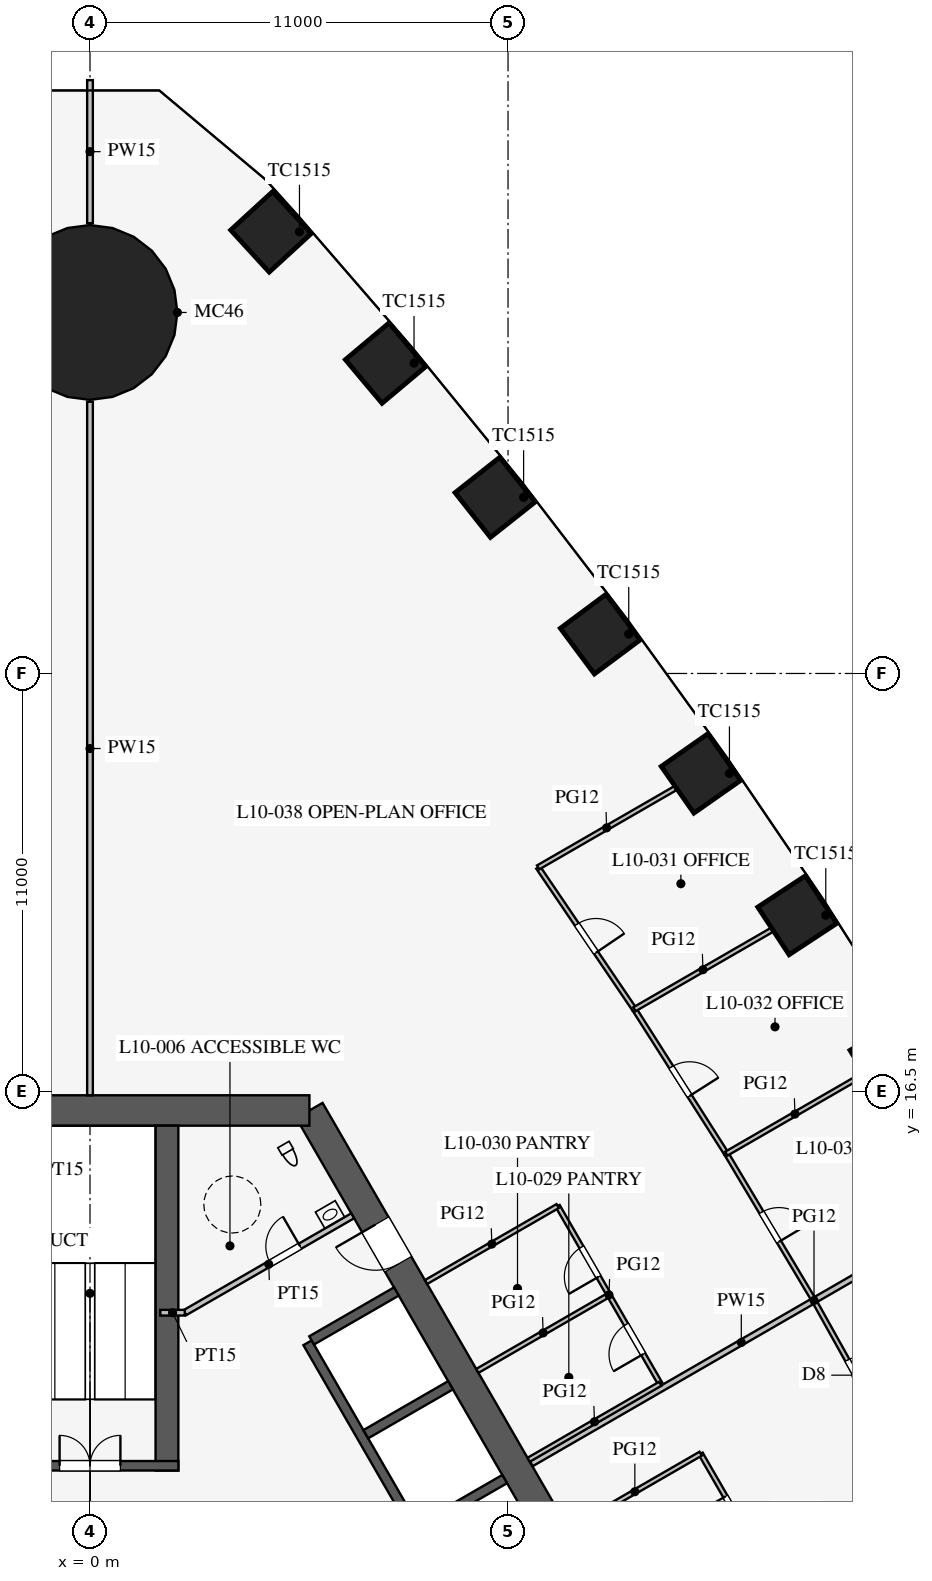
"""IFC4 building model, lengths in metres.
Left out: names, types, materials, properties, quantities, classifications, styles, units other than length and angle.
Written with IfcOpenShell. Run it as: python <this file> out.ifc"""

import sys

from ifc_helpers import new_model, si_unit, direction, frame, frame_2d, origin, origin_2d, place, context, subcontext, project, spatial, rectangle, circle, extrude, element, fill, save


model = new_model("IFC4")
c1 = context("Model", 3, precision=1e-05, world=origin(), true_north=direction((0.0, 1.0)))
c2 = subcontext(c1, "Body", "Model", "MODEL_VIEW")
j1 = project(units=[si_unit("LENGTHUNIT", "METRE"), si_unit("PLANEANGLEUNIT", "RADIAN")], contexts=[c1])
p1 = place(None, origin())
s1 = spatial("IfcSite", under=j1, at=p1, CompositionType="ELEMENT")
p2 = place(p1, origin())
s2 = spatial("IfcBuilding", under=s1, at=p2, CompositionType="ELEMENT")
p3 = place(p2, frame((0.0, 0.0, 45.9)))
s3 = spatial("IfcBuildingStorey", under=s2, at=p3, CompositionType="ELEMENT", Elevation=45.9)
for number, where, z_axis, x_axis in (
    (1, (21.031, 17.339, 0.0), (0.0, 0.0, 1.0), (-0.525, 0.851, 0.0)),
    (2, (18.611, 21.137, 0.0), (0.0, 0.0, 1.0), (-0.549, 0.836, 0.0)),
    (3, (16.076, 24.87, 0.0), (0.0, 0.0, 1.0), (-0.574, 0.819, 0.0)),
    (4, (13.426, 28.536, 0.0), (0.0, 0.0, 1.0), (-0.597, 0.802, 0.0)),
    (5, (10.66, 32.135, 0.0), (0.0, 0.0, 1.0), (-0.62, 0.784, 0.0)),
    (6, (7.776, 35.667, 0.0), (0.0, 0.0, 1.0), (-0.643, 0.766, 0.0)),
    (7, (4.762, 39.122, 0.0), (0.0, 0.0, 1.0), (-0.676, 0.737, 0.0)),
):
    element("IfcColumn", number, at=place(p3, frame(where, z_axis=z_axis, x_axis=x_axis)), inside=s3, PredefinedType="COLUMN", context=c2, shape_type="SweptSolid", body=[
        extrude(rectangle(XDim=1.5, YDim=1.5, at=origin_2d()), origin(), (0.0, 0.0, 1.0), 4.2),
    ])
p4 = place(p3, frame((0.0, 37.0, 0.0), z_axis=(0.0, 0.0, 1.0), x_axis=(1.0, 0.0, 0.0)))
e8 = element("IfcColumn", 8, at=p4, inside=s3, PredefinedType="COLUMN", context=c2, shape_type="SweptSolid", body=[
    extrude(circle(Radius=2.3, at=origin_2d()), origin(), (0.0, 0.0, 1.0), 4.2),
])
p5 = place(p3, frame((16.743, -3.0, 0.0), z_axis=(0.0, 0.0, 1.0), x_axis=(-0.500002442456, 0.866023993627, 0.0)))
e9 = element("IfcWall", 9, at=p5, inside=s3, PredefinedType="SHEAR", context=c2, shape_type="SweptSolid", body=[
    extrude(rectangle(XDim=21.939, YDim=0.8, at=frame_2d((10.97, 0.0))), origin(), (0.0, 0.0, 1.0), 4.2),
])
p6 = place(p5, frame((17.27, 0.0, 0.0)))
e10 = element("IfcOpeningElement", 10, at=p6, cuts=e9, PredefinedType="OPENING", context=c2, shape_type="SweptSolid", body=[
    extrude(rectangle(XDim=1.2, YDim=2.1, at=frame_2d((0.6, 1.05))), frame((0.0, 0.41, 0.0), z_axis=(0.0, -1.0, 0.0), x_axis=(1.0, 0.0, 0.0)), (0.0, 0.0, 1.0), 0.82),
])
p7 = place(p5, frame((3.47, 0.0, 0.0)))
e11 = element("IfcOpeningElement", 11, at=p7, cuts=e9, PredefinedType="OPENING", context=c2, shape_type="SweptSolid", body=[
    extrude(rectangle(XDim=1.2, YDim=2.1, at=frame_2d((0.6, 1.05))), frame((0.0, 0.41, 0.0), z_axis=(0.0, -1.0, 0.0), x_axis=(1.0, 0.0, 0.0)), (0.0, 0.0, 1.0), 0.82),
])
p8 = place(p3, frame((5.773, 16.0, 0.0), z_axis=(0.0, 0.0, 1.0), x_axis=(-1.0, 0.0, 0.0)))
e12 = element("IfcWall", 12, at=p8, inside=s3, PredefinedType="SHEAR", context=c2, shape_type="SweptSolid", body=[
    extrude(rectangle(XDim=11.547, YDim=0.8, at=frame_2d((5.773, 0.0))), origin(), (0.0, 0.0, 1.0), 4.2),
])
p9 = place(p3, frame((11.424, 0.014, 0.0), z_axis=(0.0, 0.0, 1.0), x_axis=(-0.500001763848, 0.866024385424, 0.0)))
e13 = element("IfcWall", 13, at=p9, inside=s3, PredefinedType="SHEAR", context=c2, shape_type="SweptSolid", body=[
    extrude(rectangle(XDim=11.4, YDim=0.25, at=frame_2d((5.7, 0.0))), origin(), (0.0, 0.0, 1.0), 4.2),
])
for number, where, z_axis, x_axis in (
    (14, (8.682, 5.012, 0.0), (0.0, 0.0, 1.0), (0.866, 0.5, 0.0)),
    (15, (7.257, 7.481, 0.0), (0.0, 0.0, 1.0), (0.866, 0.5, 0.0)),
):
    element("IfcWall", number, at=place(p3, frame(where, z_axis=z_axis, x_axis=x_axis)), inside=s3, PredefinedType="SHEAR", context=c2, shape_type="SweptSolid", body=[
        extrude(rectangle(XDim=2.575, YDim=0.25, at=frame_2d((1.288, 0.0))), origin(), (0.0, 0.0, 1.0), 4.2),
    ])
p10 = place(p3, frame((5.832, 9.949, 0.0), z_axis=(0.0, 0.0, 1.0), x_axis=(0.866029291668, 0.499993265928, 0.0)))
e16 = element("IfcWall", 16, at=p10, inside=s3, PredefinedType="SHEAR", context=c2, shape_type="SweptSolid", body=[
    extrude(rectangle(XDim=2.575, YDim=0.25, at=frame_2d((1.288, 0.0))), origin(), (0.0, 0.0, 1.0), 4.2),
])
p11 = place(p3, frame((2.025, 6.525, 0.0), z_axis=(0.0, 0.0, 1.0), x_axis=(0.0, 1.0, 0.0)))
e17 = element("IfcWall", 17, at=p11, inside=s3, PredefinedType="SHEAR", context=c2, shape_type="SweptSolid", body=[
    extrude(rectangle(XDim=9.075, YDim=0.6, at=frame_2d((4.538, 0.0))), origin(), (0.0, 0.0, 1.0), 4.2),
])
p12 = place(p3, frame((2.325, 6.65, 0.0), z_axis=(0.0, 0.0, 1.0), x_axis=(-1.0, 0.0, 0.0)))
e18 = element("IfcWall", 18, at=p12, inside=s3, PredefinedType="SHEAR", context=c2, shape_type="SweptSolid", body=[
    extrude(rectangle(XDim=4.65, YDim=0.25, at=frame_2d((2.325, 0.0))), origin(), (0.0, 0.0, 1.0), 4.2),
])
p13 = place(p12, frame((1.525, 0.0, 0.0)))
e19 = element("IfcOpeningElement", 19, at=p13, cuts=e18, PredefinedType="OPENING", context=c2, shape_type="SweptSolid", body=[
    extrude(rectangle(XDim=1.6, YDim=2.1, at=frame_2d((0.8, 1.05))), frame((0.0, 0.135, 0.0), z_axis=(0.0, -1.0, 0.0), x_axis=(1.0, 0.0, 0.0)), (0.0, 0.0, 1.0), 0.27),
])
p14 = place(p3, frame((2.495, 10.678, 0.0), z_axis=(0.0, 0.0, 1.0), x_axis=(0.86602216432, 0.500005610874, 0.0)))
e20 = element("IfcWall", 20, at=p14, inside=s3, PredefinedType="PARTITIONING", context=c2, shape_type="SweptSolid", body=[
    extrude(rectangle(XDim=5.1, YDim=0.15, at=frame_2d((2.55, 0.0))), origin(), (0.0, 0.0, 1.0), 4.0),
])
p15 = place(p14, frame((2.6, 0.0, 0.0)))
e21 = element("IfcOpeningElement", 21, at=p15, cuts=e20, PredefinedType="OPENING", context=c2, shape_type="SweptSolid", body=[
    extrude(rectangle(XDim=0.9, YDim=2.1, at=frame_2d((0.45, 1.05))), frame((0.0, 0.085, 0.0), z_axis=(0.0, -1.0, 0.0), x_axis=(1.0, 0.0, 0.0)), (0.0, 0.0, 1.0), 0.17),
])
p16 = place(p3, frame((2.495, 10.678, 0.0), z_axis=(0.0, 0.0, 1.0), x_axis=(-1.0, 0.0, 0.0)))
e22 = element("IfcWall", 22, at=p16, inside=s3, PredefinedType="PARTITIONING", context=c2, shape_type="SweptSolid", body=[
    extrude(rectangle(XDim=0.645, YDim=0.15, at=frame_2d((0.323, 0.0))), origin(), (0.0, 0.0, 1.0), 4.0),
])
p17 = place(p3, frame((0.0, 16.4, 0.0), z_axis=(0.0, 0.0, 1.0), x_axis=(0.0, 1.0, 0.0)))
e23 = element("IfcWall", 23, at=p17, inside=s3, PredefinedType="PARTITIONING", context=c2, shape_type="SweptSolid", body=[
    extrude(rectangle(XDim=18.25, YDim=0.15, at=frame_2d((9.125, 0.0))), origin(), (0.0, 0.0, 1.0), 2.3),
])
p18 = place(p3, frame((0.0, 39.35, 0.0), z_axis=(0.0, 0.0, 1.0), x_axis=(0.0, 1.0, 0.0)))
e24 = element("IfcWall", 24, at=p18, inside=s3, PredefinedType="PARTITIONING", context=c2, shape_type="SweptSolid", body=[
    extrude(rectangle(XDim=3.764, YDim=0.15, at=frame_2d((1.882, 0.0))), origin(), (0.0, 0.0, 1.0), 2.3),
])
p19 = place(p3, frame((11.613, 6.705, 0.0), z_axis=(0.0, 0.0, 1.0), x_axis=(0.86602785495, 0.499995754432, 0.0)))
e25 = element("IfcWall", 25, at=p19, inside=s3, PredefinedType="PARTITIONING", context=c2, shape_type="SweptSolid", body=[
    extrude(rectangle(XDim=12.759, YDim=0.15, at=frame_2d((6.379, 0.0))), origin(), (0.0, 0.0, 1.0), 3.2),
])
p20 = place(p3, frame((15.006, 8.808, 0.0), z_axis=(0.0, 0.0, 1.0), x_axis=(-0.500048589285, 0.86599734893, 0.0)))
e26 = element("IfcWall", 26, at=p20, inside=s3, PredefinedType="PARTITIONING", context=c2, shape_type="SweptSolid", body=[
    extrude(rectangle(XDim=2.7, YDim=0.12, at=frame_2d((1.35, 0.0))), origin(), (0.0, 0.0, 1.0), 2.9),
])
p21 = place(p20, frame((0.9, 0.0, 0.15)))
e27 = element("IfcOpeningElement", 27, at=p21, cuts=e26, PredefinedType="OPENING", context=c2, shape_type="SweptSolid", body=[
    extrude(rectangle(XDim=0.9, YDim=2.1, at=frame_2d((0.45, 1.05))), frame((0.0, 0.07, 0.0), z_axis=(0.0, -1.0, 0.0), x_axis=(1.0, 0.0, 0.0)), (0.0, 0.0, 1.0), 0.14),
])
p22 = place(p3, frame((13.656, 11.146, 0.0), z_axis=(0.0, 0.0, 1.0), x_axis=(-0.4999416173, 0.866059108428, 0.0)))
e28 = element("IfcWall", 28, at=p22, inside=s3, PredefinedType="PARTITIONING", context=c2, shape_type="SweptSolid", body=[
    extrude(rectangle(XDim=2.7, YDim=0.12, at=frame_2d((1.35, 0.0))), origin(), (0.0, 0.0, 1.0), 2.9),
])
p23 = place(p22, frame((0.55, 0.0, 0.15)))
e29 = element("IfcOpeningElement", 29, at=p23, cuts=e28, PredefinedType="OPENING", context=c2, shape_type="SweptSolid", body=[
    extrude(rectangle(XDim=0.9, YDim=2.1, at=frame_2d((0.45, 1.05))), frame((0.0, 0.07, 0.0), z_axis=(0.0, -1.0, 0.0), x_axis=(1.0, 0.0, 0.0)), (0.0, 0.0, 1.0), 0.14),
])
p24 = place(p3, frame((17.869, 3.85, 0.0), z_axis=(0.0, 0.0, 1.0), x_axis=(-0.500012057535, 0.866018442252, 0.0)))
e30 = element("IfcWall", 30, at=p24, inside=s3, PredefinedType="PARTITIONING", context=c2, shape_type="SweptSolid", body=[
    extrude(rectangle(XDim=3.6, YDim=0.12, at=frame_2d((1.8, 0.0))), origin(), (0.0, 0.0, 1.0), 2.9),
])
p25 = place(p24, frame((1.3, 0.0, 0.15)))
e31 = element("IfcOpeningElement", 31, at=p25, cuts=e30, PredefinedType="OPENING", context=c2, shape_type="SweptSolid", body=[
    extrude(rectangle(XDim=1.0, YDim=2.1, at=frame_2d((0.5, 1.05))), frame((0.0, 0.07, 0.0), z_axis=(0.0, -1.0, 0.0), x_axis=(1.0, 0.0, 0.0)), (0.0, 0.0, 1.0), 0.14),
])
for number, where, z_axis, x_axis in (
    (32, (11.542, 6.808, 0.0), (0.0, 0.0, 1.0), (0.866, 0.5, 0.0)),
    (33, (10.192, 9.146, 0.0), (0.0, 0.0, 1.0), (0.866, 0.5, 0.0)),
    (34, (8.842, 11.485, 0.0), (0.0, 0.0, 1.0), (0.866, 0.5, 0.0)),
    (35, (12.605, 4.968, 0.0), (0.0, 0.0, 1.0), (0.866, 0.5, 0.0)),
):
    element("IfcWall", number, at=place(p3, frame(where, z_axis=z_axis, x_axis=x_axis)), inside=s3, PredefinedType="PARTITIONING", context=c2, shape_type="SweptSolid", body=[
        extrude(rectangle(XDim=4.0, YDim=0.12, at=frame_2d((2.0, 0.0))), origin(), (0.0, 0.0, 1.0), 2.9),
    ])
p26 = place(p3, frame((19.052, 10.999, 0.0), z_axis=(0.0, 0.0, 1.0), x_axis=(-0.51252396108, 0.858672923364, 0.0)))
e36 = element("IfcWall", 36, at=p26, inside=s3, PredefinedType="PARTITIONING", context=c2, shape_type="SweptSolid", body=[
    extrude(rectangle(XDim=4.5, YDim=0.12, at=frame_2d((2.25, 0.0))), origin(), (0.0, 0.0, 1.0), 2.9),
])
p27 = place(p26, frame((1.8, 0.0, 0.15)))
e37 = element("IfcOpeningElement", 37, at=p27, cuts=e36, PredefinedType="OPENING", context=c2, shape_type="SweptSolid", body=[
    extrude(rectangle(XDim=0.9, YDim=2.1, at=frame_2d((0.45, 1.05))), frame((0.0, 0.07, 0.0), z_axis=(0.0, -1.0, 0.0), x_axis=(1.0, 0.0, 0.0)), (0.0, 0.0, 1.0), 0.14),
])
p28 = place(p3, frame((16.745, 14.864, 0.0), z_axis=(0.0, 0.0, 1.0), x_axis=(-0.537205132487, 0.843451626135, 0.0)))
e38 = element("IfcWall", 38, at=p28, inside=s3, PredefinedType="PARTITIONING", context=c2, shape_type="SweptSolid", body=[
    extrude(rectangle(XDim=4.504, YDim=0.12, at=frame_2d((2.252, 0.0))), origin(), (0.0, 0.0, 1.0), 2.9),
])
p29 = place(p28, frame((1.8, 0.0, 0.15)))
e39 = element("IfcOpeningElement", 39, at=p29, cuts=e38, PredefinedType="OPENING", context=c2, shape_type="SweptSolid", body=[
    extrude(rectangle(XDim=0.9, YDim=2.1, at=frame_2d((0.45, 1.05))), frame((0.0, 0.07, 0.0), z_axis=(0.0, -1.0, 0.0), x_axis=(1.0, 0.0, 0.0)), (0.0, 0.0, 1.0), 0.14),
])
p30 = place(p3, frame((14.325, 18.663, 0.0), z_axis=(0.0, 0.0, 1.0), x_axis=(-0.561512004239, 0.827468591002, 0.0)))
e40 = element("IfcWall", 40, at=p30, inside=s3, PredefinedType="PARTITIONING", context=c2, shape_type="SweptSolid", body=[
    extrude(rectangle(XDim=4.512, YDim=0.12, at=frame_2d((2.256, 0.0))), origin(), (0.0, 0.0, 1.0), 2.9),
])
p31 = place(p30, frame((1.8, 0.0, 0.15)))
e41 = element("IfcOpeningElement", 41, at=p31, cuts=e40, PredefinedType="OPENING", context=c2, shape_type="SweptSolid", body=[
    extrude(rectangle(XDim=0.9, YDim=2.1, at=frame_2d((0.45, 1.05))), frame((0.0, 0.07, 0.0), z_axis=(0.0, -1.0, 0.0), x_axis=(1.0, 0.0, 0.0)), (0.0, 0.0, 1.0), 0.14),
])
p32 = place(p3, frame((21.245, 7.07, 0.0), z_axis=(0.0, 0.0, 1.0), x_axis=(-0.487373854787, 0.873193406795, 0.0)))
e42 = element("IfcWall", 42, at=p32, inside=s3, PredefinedType="PARTITIONING", context=c2, shape_type="SweptSolid", body=[
    extrude(rectangle(XDim=4.5, YDim=0.12, at=frame_2d((2.25, 0.0))), origin(), (0.0, 0.0, 1.0), 2.9),
])
p33 = place(p32, frame((1.8, 0.0, 0.15)))
e43 = element("IfcOpeningElement", 43, at=p33, cuts=e42, PredefinedType="OPENING", context=c2, shape_type="SweptSolid", body=[
    extrude(rectangle(XDim=0.9, YDim=2.1, at=frame_2d((0.45, 1.05))), frame((0.0, 0.07, 0.0), z_axis=(0.0, -1.0, 0.0), x_axis=(1.0, 0.0, 0.0)), (0.0, 0.0, 1.0), 0.14),
])
p34 = place(p3, frame((11.792, 22.396, 0.0), z_axis=(0.0, 0.0, 1.0), x_axis=(0.866011781705, 0.500023593391, 0.0)))
e44 = element("IfcWall", 44, at=p34, inside=s3, PredefinedType="PARTITIONING", context=c2, shape_type="SweptSolid", body=[
    extrude(rectangle(XDim=4.164, YDim=0.12, at=frame_2d((2.082, 0.0))), origin(), (0.0, 0.0, 1.0), 2.9),
])
p35 = place(p3, frame((16.745, 14.864, 0.0), z_axis=(0.0, 0.0, 1.0), x_axis=(0.866025669538, 0.499999539701, 0.0)))
e45 = element("IfcWall", 45, at=p35, inside=s3, PredefinedType="PARTITIONING", context=c2, shape_type="SweptSolid", body=[
    extrude(rectangle(XDim=4.169, YDim=0.12, at=frame_2d((2.085, 0.0))), origin(), (0.0, 0.0, 1.0), 2.9),
])
p36 = place(p3, frame((14.325, 18.663, 0.0), z_axis=(0.0, 0.0, 1.0), x_axis=(0.866009971343, 0.50002672882, 0.0)))
e46 = element("IfcWall", 46, at=p36, inside=s3, PredefinedType="PARTITIONING", context=c2, shape_type="SweptSolid", body=[
    extrude(rectangle(XDim=4.167, YDim=0.12, at=frame_2d((2.083, 0.0))), origin(), (0.0, 0.0, 1.0), 2.9),
])
p37 = place(p15, origin())
e47 = element("IfcDoor", 47, at=p37, inside=s3, OperationType="SINGLE_SWING_RIGHT", PredefinedType="DOOR", context=c2, shape_type="SweptSolid", body=[
    extrude(rectangle(XDim=0.9, YDim=2.1, at=frame_2d((0.45, 1.05))), frame((0.0, 0.025, 0.0), z_axis=(0.0, -1.0, 0.0), x_axis=(1.0, 0.0, 0.0)), (0.0, 0.0, 1.0), 0.05),
])
fill(e21, e47)
p38 = place(p13, frame((1.6, 0.0, 0.0), z_axis=(0.0, 0.0, 1.0), x_axis=(-1.0, 0.0, 0.0)))
e48 = element("IfcDoor", 48, at=p38, inside=s3, OperationType="DOUBLE_DOOR_SINGLE_SWING", PredefinedType="DOOR", context=c2, shape_type="SweptSolid", body=[
    extrude(rectangle(XDim=1.6, YDim=2.1, at=frame_2d((0.8, 1.05))), frame((0.0, 0.025, 0.0), z_axis=(0.0, -1.0, 0.0), x_axis=(1.0, 0.0, 0.0)), (0.0, 0.0, 1.0), 0.05),
])
fill(e19, e48)
p39 = place(p6, origin())
e49 = element("IfcDoor", 49, at=p39, inside=s3, OperationType="SINGLE_SWING_RIGHT", PredefinedType="DOOR", context=c2, shape_type="SweptSolid", body=[
    extrude(rectangle(XDim=1.2, YDim=2.1, at=frame_2d((0.6, 1.05))), frame((0.0, 0.025, 0.0), z_axis=(0.0, -1.0, 0.0), x_axis=(1.0, 0.0, 0.0)), (0.0, 0.0, 1.0), 0.05),
])
fill(e10, e49)
p40 = place(p25, origin())
e50 = element("IfcDoor", 50, at=p40, inside=s3, OperationType="SINGLE_SWING_RIGHT", PredefinedType="DOOR", context=c2, shape_type="SweptSolid", body=[
    extrude(rectangle(XDim=1.0, YDim=2.1, at=frame_2d((0.5, 1.05))), frame((0.0, 0.025, 0.0), z_axis=(0.0, -1.0, 0.0), x_axis=(1.0, 0.0, 0.0)), (0.0, 0.0, 1.0), 0.05),
])
fill(e31, e50)
p41 = place(p21, origin())
e51 = element("IfcDoor", 51, at=p41, inside=s3, OperationType="SINGLE_SWING_LEFT", PredefinedType="DOOR", context=c2, shape_type="SweptSolid", body=[
    extrude(rectangle(XDim=0.9, YDim=2.1, at=frame_2d((0.45, 1.05))), frame((0.0, 0.025, 0.0), z_axis=(0.0, -1.0, 0.0), x_axis=(1.0, 0.0, 0.0)), (0.0, 0.0, 1.0), 0.05),
])
fill(e27, e51)
p42 = place(p23, origin())
e52 = element("IfcDoor", 52, at=p42, inside=s3, OperationType="SINGLE_SWING_LEFT", PredefinedType="DOOR", context=c2, shape_type="SweptSolid", body=[
    extrude(rectangle(XDim=0.9, YDim=2.1, at=frame_2d((0.45, 1.05))), frame((0.0, 0.025, 0.0), z_axis=(0.0, -1.0, 0.0), x_axis=(1.0, 0.0, 0.0)), (0.0, 0.0, 1.0), 0.05),
])
fill(e29, e52)
p43 = place(p31, frame((0.9, 0.0, 0.0), z_axis=(0.0, 0.0, 1.0), x_axis=(-1.0, 0.0, 0.0)))
e53 = element("IfcDoor", 53, at=p43, inside=s3, OperationType="SINGLE_SWING_RIGHT", PredefinedType="DOOR", context=c2, shape_type="SweptSolid", body=[
    extrude(rectangle(XDim=0.9, YDim=2.1, at=frame_2d((0.45, 1.05))), frame((0.0, 0.025, 0.0), z_axis=(0.0, -1.0, 0.0), x_axis=(1.0, 0.0, 0.0)), (0.0, 0.0, 1.0), 0.05),
])
fill(e41, e53)
p44 = place(p29, frame((0.9, 0.0, 0.0), z_axis=(0.0, 0.0, 1.0), x_axis=(-1.0, 0.0, 0.0)))
e54 = element("IfcDoor", 54, at=p44, inside=s3, OperationType="SINGLE_SWING_RIGHT", PredefinedType="DOOR", context=c2, shape_type="SweptSolid", body=[
    extrude(rectangle(XDim=0.9, YDim=2.1, at=frame_2d((0.45, 1.05))), frame((0.0, 0.025, 0.0), z_axis=(0.0, -1.0, 0.0), x_axis=(1.0, 0.0, 0.0)), (0.0, 0.0, 1.0), 0.05),
])
fill(e39, e54)
p45 = place(p27, frame((0.9, 0.0, 0.0), z_axis=(0.0, 0.0, 1.0), x_axis=(-1.0, 0.0, 0.0)))
e55 = element("IfcDoor", 55, at=p45, inside=s3, OperationType="SINGLE_SWING_RIGHT", PredefinedType="DOOR", context=c2, shape_type="SweptSolid", body=[
    extrude(rectangle(XDim=0.9, YDim=2.1, at=frame_2d((0.45, 1.05))), frame((0.0, 0.025, 0.0), z_axis=(0.0, -1.0, 0.0), x_axis=(1.0, 0.0, 0.0)), (0.0, 0.0, 1.0), 0.05),
])
fill(e37, e55)
p46 = place(p33, frame((0.9, 0.0, 0.0), z_axis=(0.0, 0.0, 1.0), x_axis=(-1.0, 0.0, 0.0)))
e56 = element("IfcDoor", 56, at=p46, inside=s3, OperationType="SINGLE_SWING_RIGHT", PredefinedType="DOOR", context=c2, shape_type="SweptSolid", body=[
    extrude(rectangle(XDim=0.9, YDim=2.1, at=frame_2d((0.45, 1.05))), frame((0.0, 0.025, 0.0), z_axis=(0.0, -1.0, 0.0), x_axis=(1.0, 0.0, 0.0)), (0.0, 0.0, 1.0), 0.05),
])
fill(e43, e56)
save(model, sys.argv[1])
